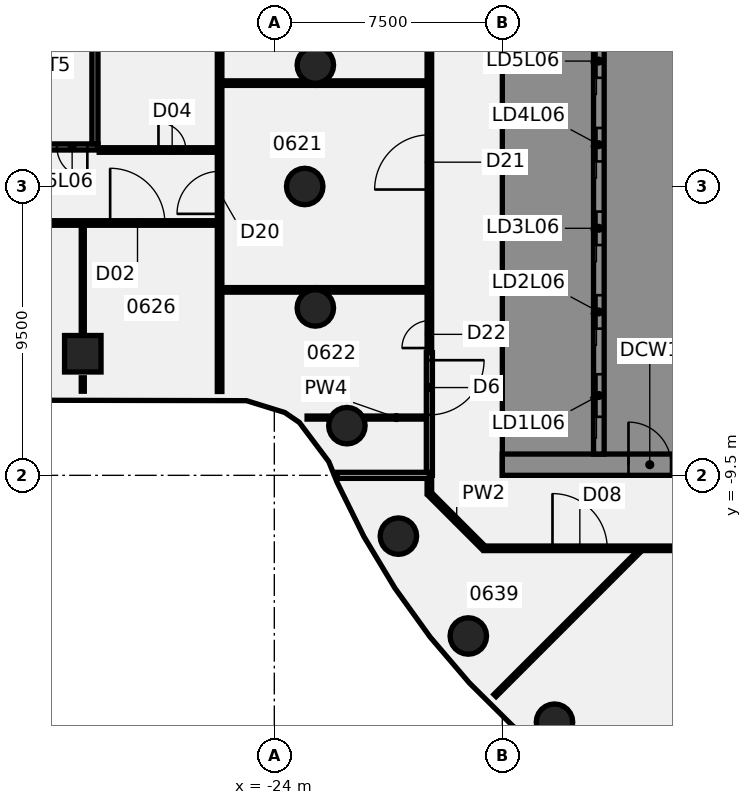
"""IFC4 building model, lengths in metres.
Left out: names, types, materials, properties, quantities, classifications, styles, units other than length and angle.
Written with IfcOpenShell. Run it as: python <this file> out.ifc"""

import sys

from ifc_helpers import new_model, si_unit, direction, frame, frame_2d, origin, origin_2d, place, context, subcontext, project, spatial, polyline, rectangle, circle, outline, extrude, element, fill, save


model = new_model("IFC4")
c1 = context("Model", 3, precision=1e-05, world=origin(), true_north=direction((0.0, 1.0)))
c2 = subcontext(c1, "Body", "Model", "MODEL_VIEW")
j1 = project(units=[si_unit("LENGTHUNIT", "METRE"), si_unit("PLANEANGLEUNIT", "RADIAN")], contexts=[c1])
p1 = place(None, origin())
s1 = spatial("IfcSite", under=j1, at=p1, CompositionType="ELEMENT")
p2 = place(p1, origin())
s2 = spatial("IfcBuilding", under=s1, at=p2, CompositionType="ELEMENT")
p3 = place(p2, frame((0.0, 0.0, 34.0)))
s3 = spatial("IfcBuildingStorey", under=s2, at=p3, CompositionType="ELEMENT", Elevation=34.0)
for number, where, z_axis, x_axis in (
    (1, (-22.651, 3.994, -0.14), (0.0, 0.0, 1.0), (1.0, 0.0, 0.0)),
    (2, (-23.0, 0.0, -0.14), (0.0, 0.0, 1.0), (1.0, 0.0, 0.0)),
    (3, (-22.651, -3.994, -0.14), (0.0, 0.0, 1.0), (1.0, 0.0, 0.0)),
    (4, (-21.613, -7.866, -0.14), (0.0, 0.0, 1.0), (1.0, 0.0, 0.0)),
    (5, (-19.919, -11.5, -0.14), (0.0, 0.0, 1.0), (1.0, 0.0, 0.0)),
    (6, (-17.619, -14.784, -0.14), (0.0, 0.0, 1.0), (1.0, 0.0, 0.0)),
    (7, (-14.784, -17.619, -0.14), (0.0, 0.0, 1.0), (1.0, 0.0, 0.0)),
):
    element("IfcColumn", number, at=place(p3, frame(where, z_axis=z_axis, x_axis=x_axis)), inside=s3, PredefinedType="COLUMN", context=c2, shape_type="SweptSolid", body=[
        extrude(circle(Radius=0.6, at=origin_2d()), origin(), (0.0, 0.0, 1.0), 3.75),
    ])
p4 = place(p3, frame((-30.299, -5.501, -0.119), z_axis=(0.027018396677, -0.040102366012, 0.998830219047), x_axis=(0.00199562335, 0.999195161414, 0.040063036514)))
e8 = element("IfcColumn", 8, at=p4, inside=s3, PredefinedType="COLUMN", context=c2, shape_type="SweptSolid", body=[
    extrude(rectangle(XDim=1.2, YDim=1.2, at=origin_2d()), origin(), (0.0, 0.0, 1.0), 3.732),
])
p5 = place(p3, frame((-18.872, -10.128, 0.0), z_axis=(0.0, 0.0, 1.0), x_axis=(0.707106781187, -0.707106781187, 0.0)))
e9 = element("IfcWall", 9, at=p5, inside=s3, PredefinedType="PARTITIONING", context=c2, shape_type="SweptSolid", body=[
    extrude(rectangle(XDim=2.465, YDim=0.15, at=frame_2d((1.232, 0.0))), origin(), (0.0, 0.0, 1.0), 3.01),
])
p6 = place(p3, frame((-39.24, -1.2, 0.0), z_axis=(0.0, 0.0, 1.0), x_axis=(1.0, 0.0, 0.0)))
e10 = element("IfcWall", 10, at=p6, inside=s3, PredefinedType="PARTITIONING", context=c2, shape_type="SweptSolid", body=[
    extrude(rectangle(XDim=13.385, YDim=0.15, at=frame_2d((6.692, 0.0))), origin(), (0.0, 0.0, 1.0), 3.01),
])
p7 = place(p6, frame((5.19, 0.0, 0.0)))
e11 = element("IfcOpeningElement", 11, at=p7, cuts=e10, PredefinedType="OPENING", context=c2, shape_type="SweptSolid", body=[
    extrude(rectangle(XDim=0.9, YDim=2.1, at=frame_2d((0.45, 1.05))), frame((0.0, 0.085, 0.0), z_axis=(0.0, -1.0, 0.0), x_axis=(1.0, 0.0, 0.0)), (0.0, 0.0, 1.0), 0.17),
])
p8 = place(p6, frame((9.84, 0.0, 0.0)))
e12 = element("IfcOpeningElement", 12, at=p8, cuts=e10, PredefinedType="OPENING", context=c2, shape_type="SweptSolid", body=[
    extrude(rectangle(XDim=1.8, YDim=2.1, at=frame_2d((0.9, 1.05))), frame((0.0, 0.085, 0.0), z_axis=(0.0, -1.0, 0.0), x_axis=(1.0, 0.0, 0.0)), (0.0, 0.0, 1.0), 0.17),
])
p9 = place(p3, frame((-29.76, 1.2, 0.0), z_axis=(0.0, 0.0, 1.0), x_axis=(1.0, 0.0, 0.0)))
e13 = element("IfcWall", 13, at=p9, inside=s3, PredefinedType="PARTITIONING", context=c2, shape_type="SweptSolid", body=[
    extrude(rectangle(XDim=3.905, YDim=0.15, at=frame_2d((1.953, 0.0))), origin(), (0.0, 0.0, 1.0), 3.01),
])
p10 = place(p9, frame((1.95, 0.0, 0.0)))
e14 = element("IfcOpeningElement", 14, at=p10, cuts=e13, PredefinedType="OPENING", context=c2, shape_type="SweptSolid", body=[
    extrude(rectangle(XDim=0.9, YDim=2.1, at=frame_2d((0.45, 1.05))), frame((0.0, 0.085, 0.0), z_axis=(0.0, -1.0, 0.0), x_axis=(1.0, 0.0, 0.0)), (0.0, 0.0, 1.0), 0.17),
])
p11 = place(p3, frame((-25.745, -3.4, 0.0), z_axis=(0.0, 0.0, 1.0), x_axis=(1.0, 0.0, 0.0)))
e15 = element("IfcWall", 15, at=p11, inside=s3, PredefinedType="PARTITIONING", context=c2, shape_type="SweptSolid", body=[
    extrude(rectangle(XDim=3.034, YDim=0.15, at=frame_2d((1.517, 0.0))), origin(), (0.0, 0.0, 1.0), 3.01),
])
p12 = place(p3, frame((-22.591, -3.4, 0.0), z_axis=(0.0, 0.0, 1.0), x_axis=(1.0, 0.0, 0.0)))
e16 = element("IfcWall", 16, at=p12, inside=s3, PredefinedType="PARTITIONING", context=c2, shape_type="SweptSolid", body=[
    extrude(rectangle(XDim=3.635, YDim=0.15, at=frame_2d((1.818, 0.0))), origin(), (0.0, 0.0, 1.0), 3.01),
])
p13 = place(p3, frame((-25.745, 3.4, 0.0), z_axis=(0.0, 0.0, 1.0), x_axis=(1.0, 0.0, 0.0)))
e17 = element("IfcWall", 17, at=p13, inside=s3, PredefinedType="PARTITIONING", context=c2, shape_type="SweptSolid", body=[
    extrude(rectangle(XDim=3.034, YDim=0.15, at=frame_2d((1.517, 0.0))), origin(), (0.0, 0.0, 1.0), 3.01),
])
p14 = place(p3, frame((-22.591, 3.4, 0.0), z_axis=(0.0, 0.0, 1.0), x_axis=(1.0, 0.0, 0.0)))
e18 = element("IfcWall", 18, at=p14, inside=s3, PredefinedType="PARTITIONING", context=c2, shape_type="SweptSolid", body=[
    extrude(rectangle(XDim=3.635, YDim=0.15, at=frame_2d((1.818, 0.0))), origin(), (0.0, 0.0, 1.0), 3.01),
])
p15 = place(p3, frame((-22.922, -7.6, 0.0), z_axis=(0.0, 0.0, 1.0), x_axis=(1.0, 0.0, 0.0)))
e19 = element("IfcWall", 19, at=p15, inside=s3, PredefinedType="PARTITIONING", context=c2, shape_type="SweptSolid", body=[
    extrude(rectangle(XDim=0.77, YDim=0.1, at=frame_2d((0.385, 0.0))), origin(), (0.0, 0.0, 1.0), 3.01),
])
p16 = place(p3, frame((-21.074, -7.6, 0.0), z_axis=(0.0, 0.0, 1.0), x_axis=(1.0, 0.0, 0.0)))
e20 = element("IfcWall", 20, at=p16, inside=s3, PredefinedType="PARTITIONING", context=c2, shape_type="SweptSolid", body=[
    extrude(rectangle(XDim=2.174, YDim=0.1, at=frame_2d((1.087, 0.0))), origin(), (0.0, 0.0, 1.0), 3.01),
])
p17 = place(p3, frame((-17.1, -11.9, 0.0), z_axis=(0.0, 0.0, 1.0), x_axis=(1.0, 0.0, 0.0)))
e21 = element("IfcWall", 21, at=p17, inside=s3, PredefinedType="PARTITIONING", context=c2, shape_type="SweptSolid", body=[
    extrude(rectangle(XDim=34.165, YDim=0.15, at=frame_2d((17.083, 0.0))), origin(), (0.0, 0.0, 1.0), 3.01),
])
p18 = place(p17, frame((16.25, 0.0, 0.0)))
e22 = element("IfcOpeningElement", 22, at=p18, cuts=e21, PredefinedType="OPENING", context=c2, shape_type="SweptSolid", body=[
    extrude(rectangle(XDim=1.8, YDim=2.1, at=frame_2d((0.9, 1.05))), frame((0.0, 0.085, 0.0), z_axis=(0.0, -1.0, 0.0), x_axis=(1.0, 0.0, 0.0)), (0.0, 0.0, 1.0), 0.17),
])
p19 = place(p17, frame((2.25, 0.0, 0.0)))
e23 = element("IfcOpeningElement", 23, at=p19, cuts=e21, PredefinedType="OPENING", context=c2, shape_type="SweptSolid", body=[
    extrude(rectangle(XDim=1.8, YDim=2.1, at=frame_2d((0.9, 1.05))), frame((0.0, 0.085, 0.0), z_axis=(0.0, -1.0, 0.0), x_axis=(1.0, 0.0, 0.0)), (0.0, 0.0, 1.0), 0.17),
])
p20 = place(p17, frame((25.6, 0.0, 0.0)))
e24 = element("IfcOpeningElement", 24, at=p20, cuts=e21, PredefinedType="OPENING", context=c2, shape_type="SweptSolid", body=[
    extrude(rectangle(XDim=1.8, YDim=2.1, at=frame_2d((0.9, 1.05))), frame((0.0, 0.085, 0.0), z_axis=(0.0, -1.0, 0.0), x_axis=(1.0, 0.0, 0.0)), (0.0, 0.0, 1.0), 0.17),
])
p21 = place(p3, frame((-16.74, -16.74, 0.0), z_axis=(0.0, 0.0, 1.0), x_axis=(0.707106781187, 0.707106781187, 0.0)))
e25 = element("IfcWall", 25, at=p21, inside=s3, PredefinedType="PARTITIONING", context=c2, shape_type="SweptSolid", body=[
    extrude(rectangle(XDim=6.715, YDim=0.1, at=frame_2d((3.358, 0.0))), origin(), (0.0, 0.0, 1.0), 3.01),
])
p22 = place(p3, frame((-30.3, -6.733, 0.0), z_axis=(0.0, 0.0, 1.0), x_axis=(0.0, 1.0, 0.0)))
e26 = element("IfcWall", 26, at=p22, inside=s3, PredefinedType="PARTITIONING", context=c2, shape_type="SweptSolid", body=[
    extrude(rectangle(XDim=0.441, YDim=0.1, at=frame_2d((0.221, 0.0))), origin(), (0.0, 0.0, 1.0), 3.01),
])
p23 = place(p3, frame((-30.3, -4.859, 0.0), z_axis=(0.0, 0.0, 1.0), x_axis=(0.0, 1.0, 0.0)))
e27 = element("IfcWall", 27, at=p23, inside=s3, PredefinedType="PARTITIONING", context=c2, shape_type="SweptSolid", body=[
    extrude(rectangle(XDim=3.599, YDim=0.1, at=frame_2d((1.799, 0.0))), origin(), (0.0, 0.0, 1.0), 3.01),
])
p24 = place(p3, frame((-25.8, -6.742, 0.0), z_axis=(0.0, 0.0, 1.0), x_axis=(0.0, 1.0, 0.0)))
e28 = element("IfcWall", 28, at=p24, inside=s3, PredefinedType="PARTITIONING", context=c2, shape_type="SweptSolid", body=[
    extrude(rectangle(XDim=13.441, YDim=0.15, at=frame_2d((6.72, 0.0))), origin(), (0.0, 0.0, 1.0), 3.01),
])
p25 = place(p24, frame((5.842, 0.0, 0.0)))
e29 = element("IfcOpeningElement", 29, at=p25, cuts=e28, PredefinedType="OPENING", context=c2, shape_type="SweptSolid", body=[
    extrude(rectangle(XDim=1.4, YDim=2.1, at=frame_2d((0.7, 1.05))), frame((0.0, 0.085, 0.0), z_axis=(0.0, -1.0, 0.0), x_axis=(1.0, 0.0, 0.0)), (0.0, 0.0, 1.0), 0.17),
])
p26 = place(p3, frame((-18.9, -10.1, 0.0), z_axis=(0.0, 0.0, 1.0), x_axis=(0.0, 1.0, 0.0)))
e30 = element("IfcWall", 30, at=p26, inside=s3, PredefinedType="PARTITIONING", context=c2, shape_type="SweptSolid", body=[
    extrude(rectangle(XDim=0.5, YDim=0.15, at=frame_2d((0.25, 0.0))), origin(), (0.0, 0.0, 1.0), 3.01),
])
p27 = place(p3, frame((-18.9, -5.363, 0.0), z_axis=(0.0, 0.0, 1.0), x_axis=(0.0, 1.0, 0.0)))
e31 = element("IfcWall", 31, at=p27, inside=s3, PredefinedType="PARTITIONING", context=c2, shape_type="SweptSolid", body=[
    extrude(rectangle(XDim=15.463, YDim=0.15, at=frame_2d((7.731, 0.0))), origin(), (0.0, 0.0, 1.0), 3.01),
])
p28 = place(p27, frame((5.263, 0.0, 0.0)))
e32 = element("IfcOpeningElement", 32, at=p28, cuts=e31, PredefinedType="OPENING", context=c2, shape_type="SweptSolid", body=[
    extrude(rectangle(XDim=1.8, YDim=2.1, at=frame_2d((0.9, 1.05))), frame((0.0, 0.085, 0.0), z_axis=(0.0, -1.0, 0.0), x_axis=(1.0, 0.0, 0.0)), (0.0, 0.0, 1.0), 0.17),
])
p29 = place(p27, frame((0.05, 0.0, 0.0)))
e33 = element("IfcOpeningElement", 33, at=p29, cuts=e31, PredefinedType="OPENING", context=c2, shape_type="SweptSolid", body=[
    extrude(rectangle(XDim=0.9, YDim=2.1, at=frame_2d((0.45, 1.05))), frame((0.0, 0.085, 0.0), z_axis=(0.0, -1.0, 0.0), x_axis=(1.0, 0.0, 0.0)), (0.0, 0.0, 1.0), 0.17),
])
p30 = place(p27, frame((10.863, 0.0, 0.0)))
e34 = element("IfcOpeningElement", 34, at=p30, cuts=e31, PredefinedType="OPENING", context=c2, shape_type="SweptSolid", body=[
    extrude(rectangle(XDim=0.9, YDim=2.1, at=frame_2d((0.45, 1.05))), frame((0.0, 0.085, 0.0), z_axis=(0.0, -1.0, 0.0), x_axis=(1.0, 0.0, 0.0)), (0.0, 0.0, 1.0), 0.17),
])
p31 = place(p3, frame((-18.9, -5.463, 0.0), z_axis=(0.0, 0.0, 1.0), x_axis=(0.0, -1.0, 0.0)))
e35 = element("IfcWall", 35, at=p31, inside=s3, PredefinedType="SOLIDWALL", context=c2, shape_type="SweptSolid", body=[
    extrude(rectangle(XDim=4.037, YDim=0.2, at=frame_2d((2.019, 0.0))), origin(), (0.0, 0.0, 1.0), 3.014),
])
p32 = place(p31, frame((0.25, 0.0, 0.0)))
e36 = element("IfcOpeningElement", 36, at=p32, cuts=e35, PredefinedType="OPENING", context=c2, shape_type="SweptSolid", body=[
    extrude(rectangle(XDim=1.8, YDim=2.4, at=frame_2d((0.9, 1.2))), frame((0.0, 0.11, 0.0), z_axis=(0.0, -1.0, 0.0), x_axis=(1.0, 0.0, 0.0)), (0.0, 0.0, 1.0), 0.22),
])
p33 = place(p3, frame((-18.9, -9.5, 0.0), z_axis=(0.0, 0.0, 1.0), x_axis=(-1.0, 0.0, 0.0)))
e37 = element("IfcWall", 37, at=p33, inside=s3, PredefinedType="SOLIDWALL", context=c2, shape_type="SweptSolid", body=[
    extrude(rectangle(XDim=3.028, YDim=0.2, at=frame_2d((1.514, 0.0))), origin(), (0.0, 0.0, 1.0), 3.61),
])
p34 = place(p3, frame((-16.5, -9.15, 0.0), z_axis=(0.0, 0.0, 1.0), x_axis=(1.0, 0.0, 0.0)))
e38 = element("IfcWall", 38, at=p34, inside=s3, PredefinedType="SHEAR", context=c2, shape_type="SweptSolid", body=[
    extrude(rectangle(XDim=13.0, YDim=0.7, at=frame_2d((6.5, 0.0))), origin(), (0.0, 0.0, 1.0), 3.61),
])
p35 = place(p34, frame((4.15, 0.0, 0.0)))
e39 = element("IfcOpeningElement", 39, at=p35, cuts=e38, PredefinedType="OPENING", context=c2, shape_type="SweptSolid", body=[
    extrude(rectangle(XDim=1.4, YDim=2.1, at=frame_2d((0.7, 1.05))), frame((0.0, 0.36, 0.0), z_axis=(0.0, -1.0, 0.0), x_axis=(1.0, 0.0, 0.0)), (0.0, 0.0, 1.0), 0.72),
])
p36 = place(p34, frame((10.125, 0.0, 0.0)))
e40 = element("IfcOpeningElement", 40, at=p36, cuts=e38, PredefinedType="OPENING", context=c2, shape_type="SweptSolid", body=[
    extrude(rectangle(XDim=1.4, YDim=2.1, at=frame_2d((0.7, 1.05))), frame((0.0, 0.36, 0.0), z_axis=(0.0, -1.0, 0.0), x_axis=(1.0, 0.0, 0.0)), (0.0, 0.0, 1.0), 0.72),
])
p37 = place(p3, origin())
e41 = element("IfcWall", 41, at=p37, inside=s3, PredefinedType="SHEAR", context=c2, shape_type="SweptSolid", body=[
    extrude(outline(polyline([(-13.5, -8.8), (-13.5, -8.125), (-15.8, -8.125), (-15.8, -5.625), (-13.5, -5.625), (-13.5, -5.375), (-15.8, -5.375), (-15.8, -2.875), (-13.5, -2.875), (-13.5, -2.625), (-15.8, -2.625), (-15.8, -0.125), (-13.5, -0.125), (-13.5, 0.125), (-15.8, 0.125), (-15.8, 2.625), (-13.5, 2.625), (-13.5, 2.875), (-15.8, 2.875), (-15.8, 5.375), (-13.5, 5.375), (-13.5, 5.625), (-15.8, 5.625), (-15.8, 8.125), (-13.5, 8.125), (-13.5, 8.8), (-15.8, 8.8), (-16.5, 8.8), (-16.5, -8.8), (-15.8, -8.8), (-13.5, -8.8)])), origin(), (0.0, 0.0, 1.0), 3.61),
])
p38 = place(p3, frame((-13.325, -8.8, 0.0), z_axis=(0.0, 0.0, 1.0), x_axis=(0.0, 1.0, 0.0)))
e42 = element("IfcWall", 42, at=p38, inside=s3, PredefinedType="SHEAR", context=c2, shape_type="SweptSolid", body=[
    extrude(rectangle(XDim=17.6, YDim=0.35, at=frame_2d((8.8, 0.0))), origin(), (0.0, 0.0, 1.0), 3.61),
])
p39 = place(p38, frame((1.225, 0.0, 0.0)))
e43 = element("IfcOpeningElement", 43, at=p39, cuts=e42, PredefinedType="OPENING", context=c2, shape_type="SweptSolid", body=[
    extrude(rectangle(XDim=1.4, YDim=2.1, at=frame_2d((0.7, 1.05))), frame((0.0, 0.185, 0.0), z_axis=(0.0, -1.0, 0.0), x_axis=(1.0, 0.0, 0.0)), (0.0, 0.0, 1.0), 0.37),
])
p40 = place(p38, frame((4.125, 0.0, 0.0)))
e44 = element("IfcOpeningElement", 44, at=p40, cuts=e42, PredefinedType="OPENING", context=c2, shape_type="SweptSolid", body=[
    extrude(rectangle(XDim=1.1, YDim=2.1, at=frame_2d((0.55, 1.05))), frame((0.0, 0.185, 0.0), z_axis=(0.0, -1.0, 0.0), x_axis=(1.0, 0.0, 0.0)), (0.0, 0.0, 1.0), 0.37),
])
p41 = place(p38, frame((6.875, 0.0, 0.0)))
e45 = element("IfcOpeningElement", 45, at=p41, cuts=e42, PredefinedType="OPENING", context=c2, shape_type="SweptSolid", body=[
    extrude(rectangle(XDim=1.1, YDim=2.1, at=frame_2d((0.55, 1.05))), frame((0.0, 0.185, 0.0), z_axis=(0.0, -1.0, 0.0), x_axis=(1.0, 0.0, 0.0)), (0.0, 0.0, 1.0), 0.37),
])
p42 = place(p38, frame((9.625, 0.0, 0.0)))
e46 = element("IfcOpeningElement", 46, at=p42, cuts=e42, PredefinedType="OPENING", context=c2, shape_type="SweptSolid", body=[
    extrude(rectangle(XDim=1.1, YDim=2.1, at=frame_2d((0.55, 1.05))), frame((0.0, 0.185, 0.0), z_axis=(0.0, -1.0, 0.0), x_axis=(1.0, 0.0, 0.0)), (0.0, 0.0, 1.0), 0.37),
])
p43 = place(p38, frame((12.375, 0.0, 0.0)))
e47 = element("IfcOpeningElement", 47, at=p43, cuts=e42, PredefinedType="OPENING", context=c2, shape_type="SweptSolid", body=[
    extrude(rectangle(XDim=1.1, YDim=2.1, at=frame_2d((0.55, 1.05))), frame((0.0, 0.185, 0.0), z_axis=(0.0, -1.0, 0.0), x_axis=(1.0, 0.0, 0.0)), (0.0, 0.0, 1.0), 0.37),
])
p44 = place(p3, frame((-29.8, 1.3, -0.14), z_axis=(0.0, 0.0, 1.0), x_axis=(-1.0, 0.0, 0.0)))
e48 = element("IfcWall", 48, at=p44, inside=s3, PredefinedType="SHEAR", context=c2, shape_type="SweptSolid", body=[
    extrude(rectangle(XDim=6.7, YDim=0.2, at=frame_2d((3.35, 0.0))), origin(), (0.0, 0.0, 1.0), 3.15),
])
p45 = place(p44, frame((0.35, 0.0, 0.0)))
e49 = element("IfcOpeningElement", 49, at=p45, cuts=e48, PredefinedType="OPENING", context=c2, shape_type="SweptSolid", body=[
    extrude(rectangle(XDim=1.0, YDim=2.1, at=frame_2d((0.5, 1.05))), frame((0.0, 0.11, 0.0), z_axis=(0.0, -1.0, 0.0), x_axis=(1.0, 0.0, 0.0)), (0.0, 0.0, 1.0), 0.22),
])
p46 = place(p3, frame((-29.9, 4.6, -0.14), z_axis=(0.0, 0.0, 1.0), x_axis=(0.0, -1.0, 0.0)))
e50 = element("IfcWall", 50, at=p46, inside=s3, PredefinedType="SHEAR", context=c2, shape_type="SweptSolid", body=[
    extrude(rectangle(XDim=3.2, YDim=0.2, at=frame_2d((1.6, 0.0))), origin(), (0.0, 0.0, 1.0), 3.15),
])
p47 = place(p8, frame((1.8, 0.0, 0.0), z_axis=(0.0, 0.0, 1.0), x_axis=(-1.0, 0.0, 0.0)))
e51 = element("IfcDoor", 51, at=p47, inside=s3, OperationType="DOUBLE_DOOR_SINGLE_SWING", PredefinedType="DOOR", context=c2, shape_type="SweptSolid", body=[
    extrude(rectangle(XDim=1.8, YDim=2.1, at=frame_2d((0.9, 1.05))), frame((0.0, 0.025, 0.0), z_axis=(0.0, -1.0, 0.0), x_axis=(1.0, 0.0, 0.0)), (0.0, 0.0, 1.0), 0.05),
])
fill(e12, e51)
p48 = place(p10, origin())
e52 = element("IfcDoor", 52, at=p48, inside=s3, OperationType="SINGLE_SWING_LEFT", PredefinedType="DOOR", context=c2, shape_type="SweptSolid", body=[
    extrude(rectangle(XDim=0.9, YDim=2.1, at=frame_2d((0.45, 1.05))), frame((0.0, 0.025, 0.0), z_axis=(0.0, -1.0, 0.0), x_axis=(1.0, 0.0, 0.0)), (0.0, 0.0, 1.0), 0.05),
])
fill(e14, e52)
p49 = place(p19, frame((1.8, 0.0, 0.0), z_axis=(0.0, 0.0, 1.0), x_axis=(-1.0, 0.0, 0.0)))
e53 = element("IfcDoor", 53, at=p49, inside=s3, OperationType="DOUBLE_DOOR_SINGLE_SWING", PredefinedType="DOOR", context=c2, shape_type="SweptSolid", body=[
    extrude(rectangle(XDim=1.8, YDim=2.1, at=frame_2d((0.9, 1.05))), frame((0.0, 0.025, 0.0), z_axis=(0.0, -1.0, 0.0), x_axis=(1.0, 0.0, 0.0)), (0.0, 0.0, 1.0), 0.05),
])
fill(e23, e53)
p50 = place(p25, frame((1.4, 0.0, 0.0), z_axis=(0.0, 0.0, 1.0), x_axis=(-1.0, 0.0, 0.0)))
e54 = element("IfcDoor", 54, at=p50, inside=s3, OperationType="DOUBLE_DOOR_SINGLE_SWING", PredefinedType="DOOR", context=c2, shape_type="SweptSolid", body=[
    extrude(rectangle(XDim=1.4, YDim=2.1, at=frame_2d((0.7, 1.05))), frame((0.0, 0.025, 0.0), z_axis=(0.0, -1.0, 0.0), x_axis=(1.0, 0.0, 0.0)), (0.0, 0.0, 1.0), 0.05),
])
fill(e29, e54)
p51 = place(p28, frame((1.8, 0.0, 0.0), z_axis=(0.0, 0.0, 1.0), x_axis=(-1.0, 0.0, 0.0)))
e55 = element("IfcDoor", 55, at=p51, inside=s3, OperationType="DOUBLE_DOOR_SINGLE_SWING", PredefinedType="DOOR", context=c2, shape_type="SweptSolid", body=[
    extrude(rectangle(XDim=1.8, YDim=2.1, at=frame_2d((0.9, 1.05))), frame((0.0, 0.025, 0.0), z_axis=(0.0, -1.0, 0.0), x_axis=(1.0, 0.0, 0.0)), (0.0, 0.0, 1.0), 0.05),
])
fill(e32, e55)
p52 = place(p29, origin())
e56 = element("IfcDoor", 56, at=p52, inside=s3, OperationType="SINGLE_SWING_RIGHT", PredefinedType="DOOR", context=c2, shape_type="SweptSolid", body=[
    extrude(rectangle(XDim=0.9, YDim=2.1, at=frame_2d((0.45, 1.05))), frame((0.0, 0.025, 0.0), z_axis=(0.0, -1.0, 0.0), x_axis=(1.0, 0.0, 0.0)), (0.0, 0.0, 1.0), 0.05),
])
fill(e33, e56)
p53 = place(p32, origin())
e57 = element("IfcDoor", 57, at=p53, inside=s3, OperationType="SINGLE_SWING_LEFT", PredefinedType="DOOR", context=c2, shape_type="SweptSolid", body=[
    extrude(rectangle(XDim=1.8, YDim=2.4, at=frame_2d((0.9, 1.2))), frame((0.0, 0.025, 0.0), z_axis=(0.0, -1.0, 0.0), x_axis=(1.0, 0.0, 0.0)), (0.0, 0.0, 1.0), 0.05),
])
fill(e36, e57)
p54 = place(p35, origin())
e58 = element("IfcDoor", 58, at=p54, inside=s3, OperationType="SINGLE_SWING_LEFT", PredefinedType="DOOR", context=c2, shape_type="SweptSolid", body=[
    extrude(rectangle(XDim=1.4, YDim=2.1, at=frame_2d((0.7, 1.05))), frame((0.0, 0.025, 0.0), z_axis=(0.0, -1.0, 0.0), x_axis=(1.0, 0.0, 0.0)), (0.0, 0.0, 1.0), 0.05),
])
fill(e39, e58)
p55 = place(p39, origin())
e59 = element("IfcDoor", 59, at=p55, inside=s3, OperationType="SLIDING_TO_LEFT", PredefinedType="DOOR", context=c2, shape_type="SweptSolid", body=[
    extrude(rectangle(XDim=1.4, YDim=2.1, at=frame_2d((0.7, 1.05))), frame((0.0, 0.025, 0.0), z_axis=(0.0, -1.0, 0.0), x_axis=(1.0, 0.0, 0.0)), (0.0, 0.0, 1.0), 0.05),
])
fill(e43, e59)
p56 = place(p40, origin())
e60 = element("IfcDoor", 60, at=p56, inside=s3, OperationType="SLIDING_TO_LEFT", PredefinedType="DOOR", context=c2, shape_type="SweptSolid", body=[
    extrude(rectangle(XDim=1.1, YDim=2.1, at=frame_2d((0.55, 1.05))), frame((0.0, 0.025, 0.0), z_axis=(0.0, -1.0, 0.0), x_axis=(1.0, 0.0, 0.0)), (0.0, 0.0, 1.0), 0.05),
])
fill(e44, e60)
p57 = place(p41, origin())
e61 = element("IfcDoor", 61, at=p57, inside=s3, OperationType="SLIDING_TO_LEFT", PredefinedType="DOOR", context=c2, shape_type="SweptSolid", body=[
    extrude(rectangle(XDim=1.1, YDim=2.1, at=frame_2d((0.55, 1.05))), frame((0.0, 0.025, 0.0), z_axis=(0.0, -1.0, 0.0), x_axis=(1.0, 0.0, 0.0)), (0.0, 0.0, 1.0), 0.05),
])
fill(e45, e61)
p58 = place(p42, origin())
e62 = element("IfcDoor", 62, at=p58, inside=s3, OperationType="SLIDING_TO_LEFT", PredefinedType="DOOR", context=c2, shape_type="SweptSolid", body=[
    extrude(rectangle(XDim=1.1, YDim=2.1, at=frame_2d((0.55, 1.05))), frame((0.0, 0.025, 0.0), z_axis=(0.0, -1.0, 0.0), x_axis=(1.0, 0.0, 0.0)), (0.0, 0.0, 1.0), 0.05),
])
fill(e46, e62)
p59 = place(p43, origin())
e63 = element("IfcDoor", 63, at=p59, inside=s3, OperationType="SLIDING_TO_LEFT", PredefinedType="DOOR", context=c2, shape_type="SweptSolid", body=[
    extrude(rectangle(XDim=1.1, YDim=2.1, at=frame_2d((0.55, 1.05))), frame((0.0, 0.025, 0.0), z_axis=(0.0, -1.0, 0.0), x_axis=(1.0, 0.0, 0.0)), (0.0, 0.0, 1.0), 0.05),
])
fill(e47, e63)
p60 = place(p45, origin())
e64 = element("IfcDoor", 64, at=p60, inside=s3, OperationType="SINGLE_SWING_LEFT", PredefinedType="DOOR", context=c2, shape_type="SweptSolid", body=[
    extrude(rectangle(XDim=1.0, YDim=2.1, at=frame_2d((0.5, 1.05))), frame((0.0, 0.025, 0.0), z_axis=(0.0, -1.0, 0.0), x_axis=(1.0, 0.0, 0.0)), (0.0, 0.0, 1.0), 0.05),
])
fill(e49, e64)
save(model, sys.argv[1])
